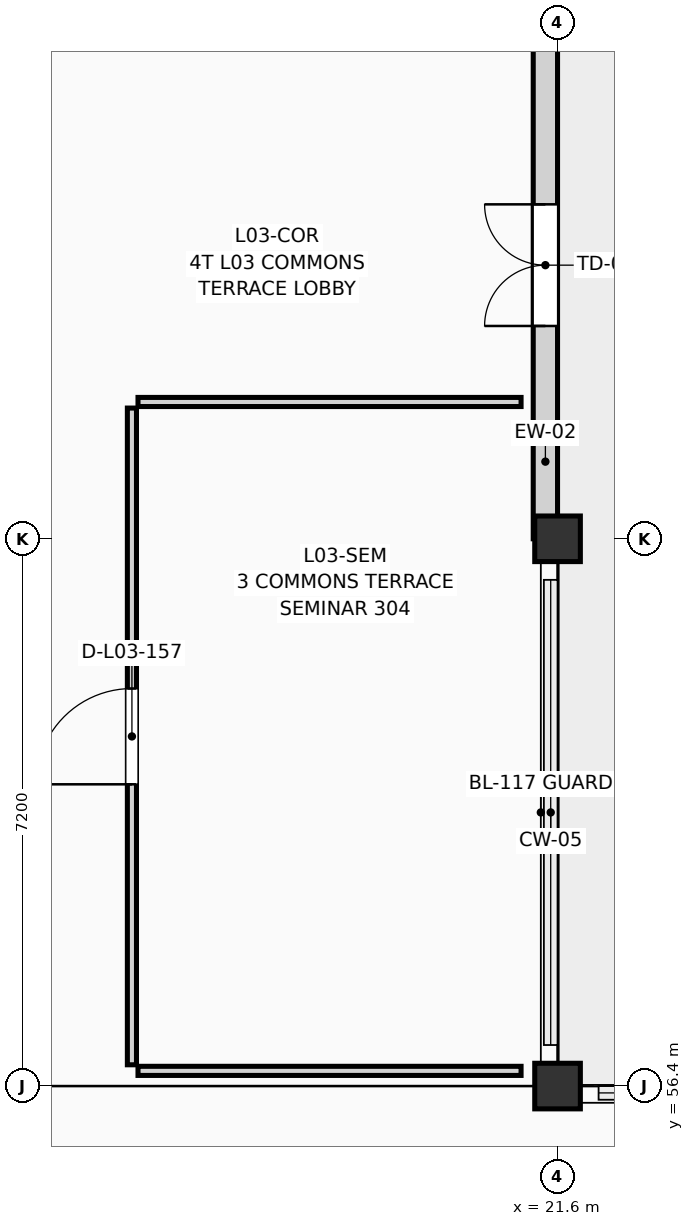
"""IFC4 building model, lengths in metres.
Left out: names, types, materials, properties, quantities, classifications, styles, units other than length and angle.
Written with IfcOpenShell. Run it as: python <this file> out.ifc"""

import sys

from ifc_helpers import new_model, si_unit, direction, frame, frame_2d, origin, origin_2d, place, context, subcontext, project, spatial, rectangle, extrude, element, fill, save


model = new_model("IFC4")
c1 = context("Model", 3, precision=1e-05, world=origin(), true_north=direction((0.0, 1.0)))
c2 = subcontext(c1, "Body", "Model", "MODEL_VIEW")
j1 = project(units=[si_unit("LENGTHUNIT", "METRE"), si_unit("PLANEANGLEUNIT", "RADIAN")], contexts=[c1])
p1 = place(None, origin())
s1 = spatial("IfcSite", under=j1, at=p1, CompositionType="ELEMENT")
p2 = place(p1, origin())
s2 = spatial("IfcBuilding", under=s1, at=p2, CompositionType="ELEMENT")
p3 = place(p2, frame((0.0, 0.0, 12.15)))
s3 = spatial("IfcBuildingStorey", under=s2, at=p3, CompositionType="ELEMENT", Elevation=12.15)
for number, where, z_axis, x_axis in (
    (1, (21.6, 56.4, 0.0), (0.0, 0.0, 1.0), (1.0, 0.0, 0.0)),
    (2, (21.6, 63.6, 0.0), (0.0, 0.0, 1.0), (1.0, 0.0, 0.0)),
):
    element("IfcColumn", number, at=place(p3, frame(where, z_axis=z_axis, x_axis=x_axis)), inside=s3, PredefinedType="COLUMN", context=c2, shape_type="SweptSolid", body=[
        extrude(rectangle(XDim=0.6, YDim=0.6, at=origin_2d()), origin(), (0.0, 0.0, 1.0), 3.6),
    ])
p4 = place(p3, frame((21.44, 63.6, 0.0), z_axis=(0.0, 0.0, 1.0), x_axis=(0.0, 1.0, 0.0)))
e3 = element("IfcWall", 3, at=p4, inside=s3, PredefinedType="SOLIDWALL", context=c2, shape_type="SweptSolid", body=[
    extrude(rectangle(XDim=7.2, YDim=0.32, at=frame_2d((3.6, 0.0))), origin(), (0.0, 0.0, 1.0), 2.84),
])
p5 = place(p4, frame((2.8, 0.0, 0.0)))
e4 = element("IfcOpeningElement", 4, at=p5, cuts=e3, PredefinedType="OPENING", context=c2, shape_type="SweptSolid", body=[
    extrude(rectangle(XDim=1.6, YDim=2.25, at=frame_2d((0.8, 1.125))), frame((0.0, 0.172, 0.0), z_axis=(0.0, -1.0, 0.0), x_axis=(1.0, 0.0, 0.0)), (0.0, 0.0, 1.0), 0.344),
])
p6 = place(p3, frame((16.0, 56.68, 0.0), z_axis=(0.0, 0.0, 1.0), x_axis=(0.0, 1.0, 0.0)))
e5 = element("IfcWall", 5, at=p6, inside=s3, PredefinedType="PARTITIONING", context=c2, shape_type="SweptSolid", body=[
    extrude(rectangle(XDim=8.64, YDim=0.12, at=frame_2d((4.32, 0.0))), origin(), (0.0, 0.0, 1.0), 3.375),
])
p7 = place(p6, frame((3.69, 0.0, 0.0)))
e6 = element("IfcOpeningElement", 6, at=p7, cuts=e5, PredefinedType="OPENING", context=c2, shape_type="SweptSolid", body=[
    extrude(rectangle(XDim=1.26, YDim=2.18, at=frame_2d((0.63, 1.09))), frame((0.0, 0.072, 0.0), z_axis=(0.0, -1.0, 0.0), x_axis=(1.0, 0.0, 0.0)), (0.0, 0.0, 1.0), 0.144),
])
p8 = place(p3, frame((16.08, 56.6, 0.0), z_axis=(0.0, 0.0, 1.0), x_axis=(1.0, 0.0, 0.0)))
e7 = element("IfcWall", 7, at=p8, inside=s3, PredefinedType="PARTITIONING", context=c2, shape_type="SweptSolid", body=[
    extrude(rectangle(XDim=5.04, YDim=0.12, at=frame_2d((2.52, 0.0))), origin(), (0.0, 0.0, 1.0), 2.691),
])
p9 = place(p3, frame((16.08, 65.4, 0.0), z_axis=(0.0, 0.0, 1.0), x_axis=(1.0, 0.0, 0.0)))
e8 = element("IfcWall", 8, at=p9, inside=s3, PredefinedType="PARTITIONING", context=c2, shape_type="SweptSolid", body=[
    extrude(rectangle(XDim=5.04, YDim=0.12, at=frame_2d((2.52, 0.0))), origin(), (0.0, 0.0, 1.0), 3.375),
])
p10 = place(p5, origin())
e9 = element("IfcDoor", 9, at=p10, inside=s3, OperationType="DOUBLE_DOOR_SINGLE_SWING", PredefinedType="DOOR", context=c2, shape_type="SweptSolid", body=[
    extrude(rectangle(XDim=1.6, YDim=2.25, at=frame_2d((0.8, 1.125))), frame((0.0, 0.025, 0.0), z_axis=(0.0, -1.0, 0.0), x_axis=(1.0, 0.0, 0.0)), (0.0, 0.0, 1.0), 0.05),
])
fill(e4, e9)
p11 = place(p7, origin())
e10 = element("IfcDoor", 10, at=p11, inside=s3, OperationType="SINGLE_SWING_LEFT", PredefinedType="DOOR", context=c2, shape_type="SweptSolid", body=[
    extrude(rectangle(XDim=1.26, YDim=2.18, at=frame_2d((0.63, 1.09))), frame((0.0, 0.025, 0.0), z_axis=(0.0, -1.0, 0.0), x_axis=(1.0, 0.0, 0.0)), (0.0, 0.0, 1.0), 0.05),
])
fill(e6, e10)
save(model, sys.argv[1])
